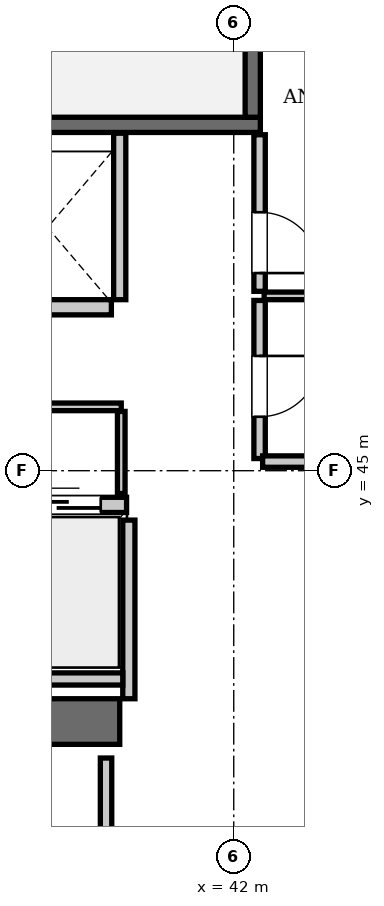
"""IFC4 building model, lengths in metres.
Left out: names, types, materials, properties, quantities, classifications, styles, units other than length and angle.
Written with IfcOpenShell. Run it as: python <this file> out.ifc"""

import sys

from ifc_helpers import new_model, si_unit, direction, frame, frame_2d, origin, place, context, subcontext, project, spatial, rectangle, extrude, element, fill, save


model = new_model("IFC4")
c1 = context("Model", 3, precision=1e-05, world=origin(), true_north=direction((0.0, 1.0)))
c2 = subcontext(c1, "Body", "Model", "MODEL_VIEW")
j1 = project(units=[si_unit("LENGTHUNIT", "METRE"), si_unit("PLANEANGLEUNIT", "RADIAN")], contexts=[c1])
p1 = place(None, origin())
s1 = spatial("IfcSite", under=j1, at=p1, CompositionType="ELEMENT")
p2 = place(p1, origin())
s2 = spatial("IfcBuilding", under=s1, at=p2, CompositionType="ELEMENT")
p3 = place(p2, frame((0.0, 0.0, 270.2)))
s3 = spatial("IfcBuildingStorey", under=s2, at=p3, CompositionType="ELEMENT", Elevation=270.2)
p4 = place(p3, frame((35.1, 41.7, 0.0), z_axis=(0.0, 0.0, 1.0), x_axis=(1.0, 0.0, 0.0)))
e1 = element("IfcWall", 1, at=p4, inside=s3, PredefinedType="SHEAR", context=c2, shape_type="SweptSolid", body=[
    extrude(rectangle(XDim=5.4, YDim=0.6, at=frame_2d((2.7, 0.0))), origin(), (0.0, 0.0, 1.0), 3.85),
])
p5 = place(p3, frame((33.25, 49.55, 0.0), z_axis=(0.0, 0.0, 1.0), x_axis=(1.0, 0.0, 0.0)))
e2 = element("IfcWall", 2, at=p5, inside=s3, PredefinedType="SOLIDWALL", context=c2, shape_type="SweptSolid", body=[
    extrude(rectangle(XDim=9.1, YDim=0.2, at=frame_2d((4.55, 0.0))), origin(), (0.0, 0.0, 1.0), 3.61),
])
p6 = place(p3, frame((42.25, 49.65, 0.0), z_axis=(0.0, 0.0, 1.0), x_axis=(0.0, 1.0, 0.0)))
e3 = element("IfcWall", 3, at=p6, inside=s3, PredefinedType="SOLIDWALL", context=c2, shape_type="SweptSolid", body=[
    extrude(rectangle(XDim=3.75, YDim=0.2, at=frame_2d((1.875, 0.0))), origin(), (0.0, 0.0, 1.0), 3.61),
])
p7 = place(p3, frame((38.91, 44.55, 0.0), z_axis=(0.0, 0.0, 1.0), x_axis=(1.0, 0.0, 0.0)))
e4 = element("IfcWall", 4, at=p7, inside=s3, PredefinedType="SOLIDWALL", context=c2, shape_type="SweptSolid", body=[
    extrude(rectangle(XDim=1.68, YDim=0.2, at=frame_2d((0.84, 0.0))), origin(), (0.0, 0.0, 1.0), 3.61),
])
p8 = place(p7, frame((0.34, 0.0, 0.0)))
e5 = element("IfcOpeningElement", 5, at=p8, cuts=e4, PredefinedType="OPENING", context=c2, shape_type="SweptSolid", body=[
    extrude(rectangle(XDim=1.0, YDim=2.15, at=frame_2d((0.5, 1.075))), frame((0.0, 0.11, 0.0), z_axis=(0.0, -1.0, 0.0), x_axis=(1.0, 0.0, 0.0)), (0.0, 0.0, 1.0), 0.22),
])
p9 = place(p3, frame((38.71, 47.15, 0.0), z_axis=(0.0, 0.0, 1.0), x_axis=(1.0, 0.0, 0.0)))
e6 = element("IfcWall", 6, at=p9, inside=s3, PredefinedType="SOLIDWALL", context=c2, shape_type="SweptSolid", body=[
    extrude(rectangle(XDim=1.68, YDim=0.2, at=frame_2d((0.84, 0.0))), origin(), (0.0, 0.0, 1.0), 3.61),
])
p10 = place(p3, frame((40.62, 42.0, 0.0), z_axis=(0.0, 0.0, 1.0), x_axis=(0.0, 1.0, 0.0)))
e7 = element("IfcWall", 7, at=p10, inside=s3, PredefinedType="SOLIDWALL", context=c2, shape_type="SweptSolid", body=[
    extrude(rectangle(XDim=2.35, YDim=0.16, at=frame_2d((1.175, 0.0))), origin(), (0.0, 0.0, 1.0), 3.61),
])
p11 = place(p3, frame((35.52, 42.26, 0.0), z_axis=(0.0, 0.0, 1.0), x_axis=(1.0, 0.0, 0.0)))
e8 = element("IfcWall", 8, at=p11, inside=s3, PredefinedType="SOLIDWALL", context=c2, shape_type="SweptSolid", body=[
    extrude(rectangle(XDim=5.02, YDim=0.16, at=frame_2d((2.51, 0.0))), origin(), (0.0, 0.0, 1.0), 3.61),
])
p12 = place(p3, frame((40.5, 47.25, 0.0), z_axis=(0.0, 0.0, 1.0), x_axis=(0.0, 1.0, 0.0)))
e9 = element("IfcWall", 9, at=p12, inside=s3, PredefinedType="SOLIDWALL", context=c2, shape_type="SweptSolid", body=[
    extrude(rectangle(XDim=2.19, YDim=0.16, at=frame_2d((1.095, 0.0))), origin(), (0.0, 0.0, 1.0), 3.61),
])
p13 = place(p3, frame((35.58, 45.84, 0.0), z_axis=(0.0, 0.0, 1.0), x_axis=(1.0, 0.0, 0.0)))
e10 = element("IfcWall", 10, at=p13, inside=s3, PredefinedType="PARTITIONING", context=c2, shape_type="SweptSolid", body=[
    extrude(rectangle(XDim=4.94, YDim=0.1, at=frame_2d((2.47, 0.0))), origin(), (0.0, 0.0, 1.0), 3.61),
])
p14 = place(p13, frame((1.8, 0.0, 0.0)))
e11 = element("IfcOpeningElement", 11, at=p14, cuts=e10, PredefinedType="OPENING", context=c2, shape_type="SweptSolid", body=[
    extrude(rectangle(XDim=0.8, YDim=2.05, at=frame_2d((0.4, 1.025))), frame((0.0, 0.06, 0.0), z_axis=(0.0, -1.0, 0.0), x_axis=(1.0, 0.0, 0.0)), (0.0, 0.0, 1.0), 0.12),
])
p15 = place(p3, frame((40.52, 44.7, 0.0), z_axis=(0.0, 0.0, 1.0), x_axis=(0.0, 1.0, 0.0)))
e12 = element("IfcWall", 12, at=p15, inside=s3, PredefinedType="PARTITIONING", context=c2, shape_type="SweptSolid", body=[
    extrude(rectangle(XDim=1.08, YDim=0.1, at=frame_2d((0.54, 0.0))), origin(), (0.0, 0.0, 1.0), 3.61),
])
p16 = place(p3, frame((42.34, 45.16, 0.0), z_axis=(0.0, 0.0, 1.0), x_axis=(0.0, 1.0, 0.0)))
e13 = element("IfcWall", 13, at=p16, inside=s3, PredefinedType="PARTITIONING", context=c2, shape_type="SweptSolid", body=[
    extrude(rectangle(XDim=2.08, YDim=0.15, at=frame_2d((1.04, 0.0))), origin(), (0.0, 0.0, 1.0), 3.61),
])
p17 = place(p16, frame((0.55, 0.0, 0.0)))
e14 = element("IfcOpeningElement", 14, at=p17, cuts=e13, PredefinedType="OPENING", context=c2, shape_type="SweptSolid", body=[
    extrude(rectangle(XDim=0.8, YDim=2.05, at=frame_2d((0.4, 1.025))), frame((0.0, 0.085, 0.0), z_axis=(0.0, -1.0, 0.0), x_axis=(1.0, 0.0, 0.0)), (0.0, 0.0, 1.0), 0.17),
])
p18 = place(p3, frame((42.34, 47.36, 0.0), z_axis=(0.0, 0.0, 1.0), x_axis=(0.0, 1.0, 0.0)))
e15 = element("IfcWall", 15, at=p18, inside=s3, PredefinedType="PARTITIONING", context=c2, shape_type="SweptSolid", body=[
    extrude(rectangle(XDim=2.06, YDim=0.15, at=frame_2d((1.03, 0.0))), origin(), (0.0, 0.0, 1.0), 3.61),
])
p19 = place(p18, frame((0.24, 0.0, 0.0)))
e16 = element("IfcOpeningElement", 16, at=p19, cuts=e15, PredefinedType="OPENING", context=c2, shape_type="SweptSolid", body=[
    extrude(rectangle(XDim=0.8, YDim=2.05, at=frame_2d((0.4, 1.025))), frame((0.0, 0.085, 0.0), z_axis=(0.0, -1.0, 0.0), x_axis=(1.0, 0.0, 0.0)), (0.0, 0.0, 1.0), 0.17),
])
p20 = place(p3, frame((42.4, 47.3, 0.0), z_axis=(0.0, 0.0, 1.0), x_axis=(1.0, 0.0, 0.0)))
e17 = element("IfcWall", 17, at=p20, inside=s3, PredefinedType="PARTITIONING", context=c2, shape_type="SweptSolid", body=[
    extrude(rectangle(XDim=3.1, YDim=0.1, at=frame_2d((1.55, 0.0))), origin(), (0.0, 0.0, 1.0), 3.61),
])
p21 = place(p3, frame((42.38, 45.12, 0.0), z_axis=(0.0, 0.0, 1.0), x_axis=(1.0, 0.0, 0.0)))
e18 = element("IfcWall", 18, at=p21, inside=s3, PredefinedType="PARTITIONING", context=c2, shape_type="SweptSolid", body=[
    extrude(rectangle(XDim=3.14, YDim=0.15, at=frame_2d((1.57, 0.0))), origin(), (0.0, 0.0, 1.0), 3.61),
])
p22 = place(p3, frame((40.32, 38.38, 0.0), z_axis=(0.0, 0.0, 1.0), x_axis=(0.0, 1.0, 0.0)))
e19 = element("IfcWall", 19, at=p22, inside=s3, PredefinedType="PARTITIONING", context=c2, shape_type="SweptSolid", body=[
    extrude(rectangle(XDim=2.84, YDim=0.15, at=frame_2d((1.42, 0.0))), origin(), (0.0, 0.0, 1.0), 3.61),
])
p23 = place(p8, origin())
e20 = element("IfcDoor", 20, at=p23, inside=s3, OperationType="SLIDING_TO_LEFT", PredefinedType="DOOR", context=c2, shape_type="SweptSolid", body=[
    extrude(rectangle(XDim=1.0, YDim=2.15, at=frame_2d((0.5, 1.075))), frame((0.0, 0.025, 0.0), z_axis=(0.0, -1.0, 0.0), x_axis=(1.0, 0.0, 0.0)), (0.0, 0.0, 1.0), 0.05),
])
fill(e5, e20)
p24 = place(p17, frame((0.8, 0.0, 0.0), z_axis=(0.0, 0.0, 1.0), x_axis=(-1.0, 0.0, 0.0)))
e21 = element("IfcDoor", 21, at=p24, inside=s3, OperationType="SINGLE_SWING_LEFT", PredefinedType="DOOR", context=c2, shape_type="SweptSolid", body=[
    extrude(rectangle(XDim=0.8, YDim=2.05, at=frame_2d((0.4, 1.025))), frame((0.0, 0.025, 0.0), z_axis=(0.0, -1.0, 0.0), x_axis=(1.0, 0.0, 0.0)), (0.0, 0.0, 1.0), 0.05),
])
fill(e14, e21)
p25 = place(p19, frame((0.8, 0.0, 0.0), z_axis=(0.0, 0.0, 1.0), x_axis=(-1.0, 0.0, 0.0)))
e22 = element("IfcDoor", 22, at=p25, inside=s3, OperationType="SINGLE_SWING_RIGHT", PredefinedType="DOOR", context=c2, shape_type="SweptSolid", body=[
    extrude(rectangle(XDim=0.8, YDim=2.05, at=frame_2d((0.4, 1.025))), frame((0.0, 0.025, 0.0), z_axis=(0.0, -1.0, 0.0), x_axis=(1.0, 0.0, 0.0)), (0.0, 0.0, 1.0), 0.05),
])
fill(e16, e22)
save(model, sys.argv[1])
